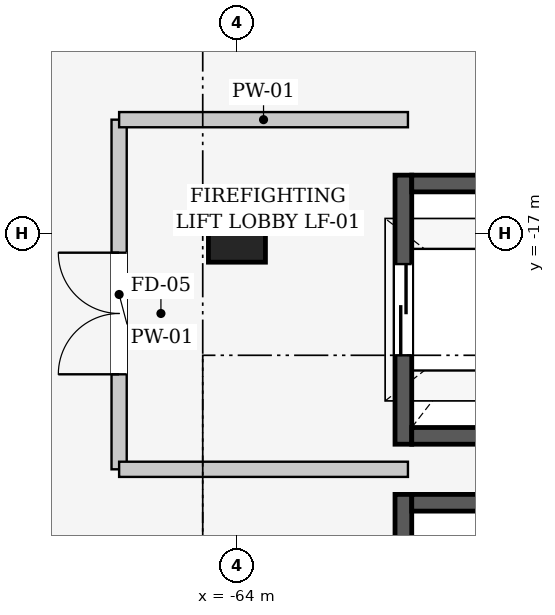
"""IFC4 building model, lengths in metres.
Left out: names, types, materials, properties, quantities, classifications, styles, units other than length and angle.
Written with IfcOpenShell. Run it as: python <this file> out.ifc"""

import sys

from ifc_helpers import new_model, si_unit, direction, frame, frame_2d, origin, origin_2d, place, context, subcontext, project, spatial, rectangle, extrude, element, fill, save


model = new_model("IFC4")
c1 = context("Model", 3, precision=1e-05, world=origin(), true_north=direction((0.0, 1.0)))
c2 = subcontext(c1, "Body", "Model", "MODEL_VIEW")
j1 = project(units=[si_unit("LENGTHUNIT", "METRE"), si_unit("PLANEANGLEUNIT", "RADIAN")], contexts=[c1])
p1 = place(None, origin())
s1 = spatial("IfcSite", under=j1, at=p1, CompositionType="ELEMENT")
p2 = place(p1, origin())
s2 = spatial("IfcBuilding", under=s1, at=p2, CompositionType="ELEMENT")
p3 = place(p2, frame((0.0, 0.0, 21.0)))
s3 = spatial("IfcBuildingStorey", under=s2, at=p3, CompositionType="ELEMENT", Elevation=21.0)
p4 = place(p3, frame((-64.0, -17.0, 0.0), z_axis=(0.0, 0.0, 1.0), x_axis=(1.0, 0.0, 0.0)))
e1 = element("IfcColumn", 1, at=p4, inside=s3, PredefinedType="COLUMN", context=c2, shape_type="SweptSolid", body=[
    extrude(rectangle(XDim=0.75, YDim=0.75, at=origin_2d()), origin(), (0.0, 0.0, 1.0), 5.4),
])
p5 = place(p3, frame((-61.81, -19.77, 0.0), z_axis=(0.0, 0.0, 1.0), x_axis=(0.0, 1.0, 0.0)))
e2 = element("IfcWall", 2, at=p5, inside=s3, PredefinedType="SHEAR", context=c2, shape_type="SweptSolid", body=[
    extrude(rectangle(XDim=3.54, YDim=0.22, at=frame_2d((1.77, 0.0))), origin(), (0.0, 0.0, 1.0), 5.4),
])
p6 = place(p5, frame((1.17, 0.0, 0.0)))
e3 = element("IfcOpeningElement", 3, at=p6, cuts=e2, PredefinedType="OPENING", context=c2, shape_type="SweptSolid", body=[
    extrude(rectangle(XDim=1.2, YDim=2.2, at=frame_2d((0.6, 1.1))), frame((0.0, 0.12, 0.0), z_axis=(0.0, -1.0, 0.0), x_axis=(1.0, 0.0, 0.0)), (0.0, 0.0, 1.0), 0.24),
])
for number, where, z_axis, x_axis in (
    (4, (-61.7, -16.34, 0.0), (0.0, 0.0, 1.0), (1.0, 0.0, 0.0)),
    (5, (-59.3, -19.66, 0.0), (0.0, 0.0, 1.0), (-1.0, 0.0, 0.0)),
):
    element("IfcWall", number, at=place(p3, frame(where, z_axis=z_axis, x_axis=x_axis)), inside=s3, PredefinedType="SHEAR", context=c2, shape_type="SweptSolid", body=[
        extrude(rectangle(XDim=2.4, YDim=0.22, at=frame_2d((1.2, 0.0))), origin(), (0.0, 0.0, 1.0), 5.4),
    ])
p7 = place(p3, frame((-61.81, -23.97, 0.0), z_axis=(0.0, 0.0, 1.0), x_axis=(0.0, 1.0, 0.0)))
e6 = element("IfcWall", 6, at=p7, inside=s3, PredefinedType="SHEAR", context=c2, shape_type="SweptSolid", body=[
    extrude(rectangle(XDim=3.54, YDim=0.22, at=frame_2d((1.77, 0.0))), origin(), (0.0, 0.0, 1.0), 5.4),
])
p8 = place(p7, frame((1.22, 0.0, 0.0)))
e7 = element("IfcOpeningElement", 7, at=p8, cuts=e6, PredefinedType="OPENING", context=c2, shape_type="SweptSolid", body=[
    extrude(rectangle(XDim=1.1, YDim=2.2, at=frame_2d((0.55, 1.1))), frame((0.0, 0.12, 0.0), z_axis=(0.0, -1.0, 0.0), x_axis=(1.0, 0.0, 0.0)), (0.0, 0.0, 1.0), 0.24),
])
p9 = place(p3, frame((-61.7, -20.54, 0.0), z_axis=(0.0, 0.0, 1.0), x_axis=(1.0, 0.0, 0.0)))
e8 = element("IfcWall", 8, at=p9, inside=s3, PredefinedType="SHEAR", context=c2, shape_type="SweptSolid", body=[
    extrude(rectangle(XDim=2.4, YDim=0.22, at=frame_2d((1.2, 0.0))), origin(), (0.0, 0.0, 1.0), 5.4),
])
p10 = place(p3, frame((-65.55, -20.1, 0.0), z_axis=(0.0, 0.0, 1.0), x_axis=(0.0, 1.0, 0.0)))
e9 = element("IfcWall", 9, at=p10, inside=s3, PredefinedType="PARTITIONING", context=c2, shape_type="SweptSolid", body=[
    extrude(rectangle(XDim=4.6, YDim=0.2, at=frame_2d((2.3, 0.0))), origin(), (0.0, 0.0, 1.0), 4.145),
])
p11 = place(p10, frame((1.25, 0.0, 0.0)))
e10 = element("IfcOpeningElement", 10, at=p11, cuts=e9, PredefinedType="OPENING", context=c2, shape_type="SweptSolid", body=[
    extrude(rectangle(XDim=1.6, YDim=2.2, at=frame_2d((0.8, 1.1))), frame((0.0, 0.11, 0.0), z_axis=(0.0, -1.0, 0.0), x_axis=(1.0, 0.0, 0.0)), (0.0, 0.0, 1.0), 0.22),
])
for number, where, z_axis, x_axis in (
    (11, (-65.55, -15.5, 0.0), (0.0, 0.0, 1.0), (1.0, 0.0, 0.0)),
    (12, (-61.75, -20.1, 0.0), (0.0, 0.0, 1.0), (-1.0, 0.0, 0.0)),
):
    element("IfcWall", number, at=place(p3, frame(where, z_axis=z_axis, x_axis=x_axis)), inside=s3, PredefinedType="PARTITIONING", context=c2, shape_type="SweptSolid", body=[
        extrude(rectangle(XDim=3.8, YDim=0.2, at=frame_2d((1.9, 0.0))), origin(), (0.0, 0.0, 1.0), 4.445),
    ])
p12 = place(p6, origin())
e13 = element("IfcDoor", 13, at=p12, inside=s3, OperationType="SLIDING_TO_LEFT", PredefinedType="DOOR", context=c2, shape_type="SweptSolid", body=[
    extrude(rectangle(XDim=1.2, YDim=2.2, at=frame_2d((0.6, 1.1))), frame((0.0, 0.025, 0.0), z_axis=(0.0, -1.0, 0.0), x_axis=(1.0, 0.0, 0.0)), (0.0, 0.0, 1.0), 0.05),
])
fill(e3, e13)
p13 = place(p11, origin())
e14 = element("IfcDoor", 14, at=p13, inside=s3, OperationType="DOUBLE_DOOR_SINGLE_SWING", PredefinedType="DOOR", context=c2, shape_type="SweptSolid", body=[
    extrude(rectangle(XDim=1.6, YDim=2.2, at=frame_2d((0.8, 1.1))), frame((0.0, 0.025, 0.0), z_axis=(0.0, -1.0, 0.0), x_axis=(1.0, 0.0, 0.0)), (0.0, 0.0, 1.0), 0.05),
])
fill(e10, e14)
save(model, sys.argv[1])
